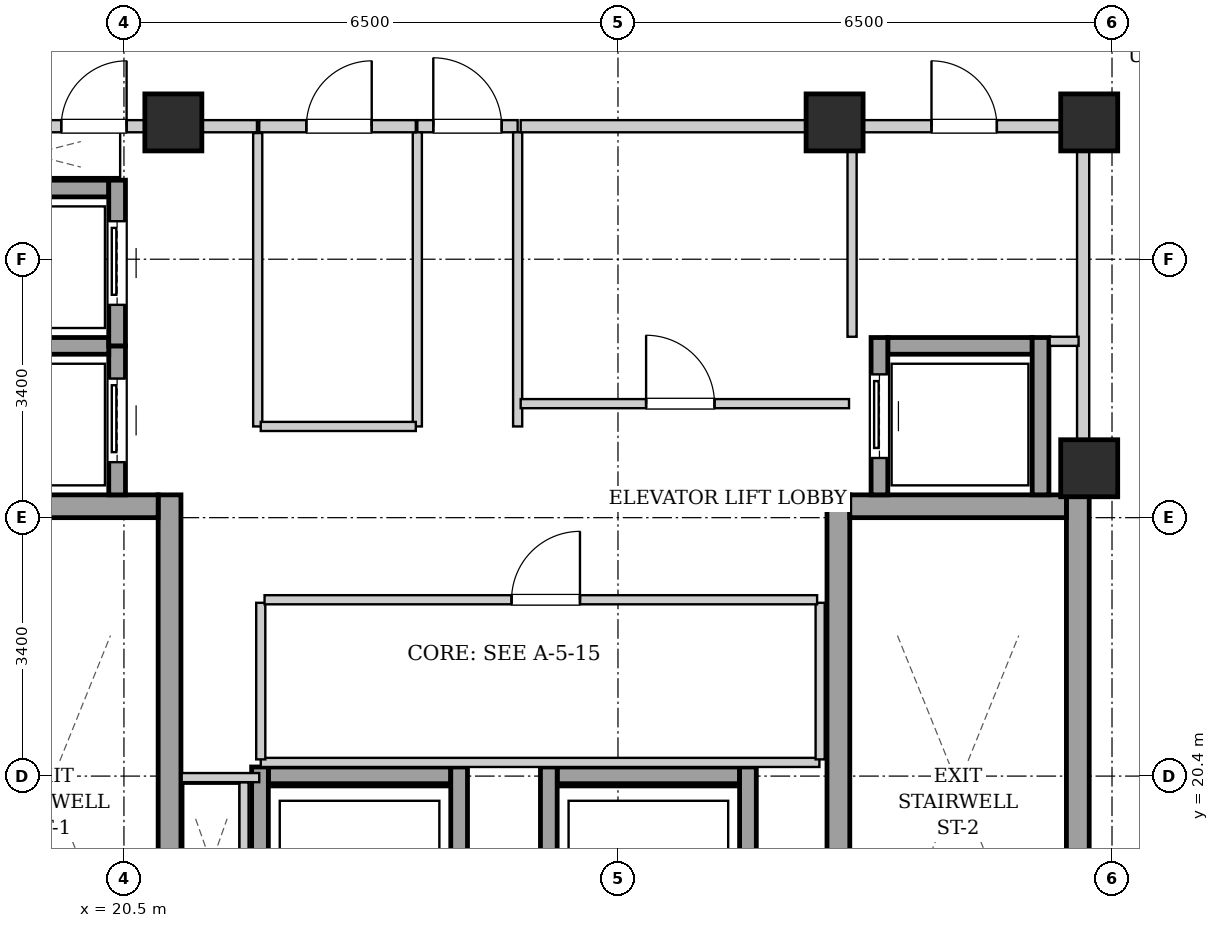
"""IFC4 building model, lengths in metres.
Left out: names, types, materials, properties, quantities, classifications, styles, units other than length and angle.
Written with IfcOpenShell. Run it as: python <this file> out.ifc"""

import sys

from ifc_helpers import new_model, si_unit, direction, frame, frame_2d, origin, origin_2d, place, context, subcontext, project, spatial, rectangle, extrude, element, fill, save


model = new_model("IFC4")
c1 = context("Model", 3, precision=1e-05, world=origin(), true_north=direction((0.0, 1.0)))
c2 = subcontext(c1, "Body", "Model", "MODEL_VIEW")
j1 = project(units=[si_unit("LENGTHUNIT", "METRE"), si_unit("PLANEANGLEUNIT", "RADIAN")], contexts=[c1])
p1 = place(None, origin())
s1 = spatial("IfcSite", under=j1, at=p1, CompositionType="ELEMENT")
p2 = place(p1, origin())
s2 = spatial("IfcBuilding", under=s1, at=p2, CompositionType="ELEMENT")
p3 = place(p2, frame((0.0, 0.0, 247.9)))
s3 = spatial("IfcBuildingStorey", under=s2, at=p3, CompositionType="ELEMENT", Elevation=247.9)
for number, where, z_axis, x_axis in (
    (1, (21.15, 29.0, 0.0), (0.0, 0.0, 1.0), (1.0, 0.0, 0.0)),
    (2, (29.85, 29.0, 0.0), (0.0, 0.0, 1.0), (1.0, 0.0, 0.0)),
    (3, (33.2, 29.0, 0.0), (0.0, 0.0, 1.0), (1.0, 0.0, 0.0)),
    (4, (33.2, 24.45, 0.0), (0.0, 0.0, 1.0), (1.0, 0.0, 0.0)),
):
    element("IfcColumn", number, at=place(p3, frame(where, z_axis=z_axis, x_axis=x_axis)), inside=s3, PredefinedType="COLUMN", context=c2, shape_type="SweptSolid", body=[
        extrude(rectangle(XDim=0.75, YDim=0.75, at=origin_2d()), origin(), (0.0, 0.0, 1.0), 3.4),
    ])
p4 = place(p3, frame((21.1, 15.1, 0.0), z_axis=(0.0, 0.0, 1.0), x_axis=(0.0, 1.0, 0.0)))
e5 = element("IfcWall", 5, at=p4, inside=s3, PredefinedType="SHEAR", context=c2, shape_type="SweptSolid", body=[
    extrude(rectangle(XDim=9.0, YDim=0.3, at=frame_2d((4.5, 0.0))), origin(), (0.0, 0.0, 1.0), 3.14),
])
p5 = place(p3, frame((18.1, 23.95, 0.0), z_axis=(0.0, 0.0, 1.0), x_axis=(1.0, 0.0, 0.0)))
e6 = element("IfcWall", 6, at=p5, inside=s3, PredefinedType="SHEAR", context=c2, shape_type="SweptSolid", body=[
    extrude(rectangle(XDim=2.85, YDim=0.3, at=frame_2d((1.425, 0.0))), origin(), (0.0, 0.0, 1.0), 3.14),
])
for number, where, z_axis, x_axis in (
    (7, (29.9, 15.1, 0.0), (0.0, 0.0, 1.0), (0.0, 1.0, 0.0)),
    (8, (33.05, 15.1, 0.0), (0.0, 0.0, 1.0), (0.0, 1.0, 0.0)),
):
    element("IfcWall", number, at=place(p3, frame(where, z_axis=z_axis, x_axis=x_axis)), inside=s3, PredefinedType="SHEAR", context=c2, shape_type="SweptSolid", body=[
        extrude(rectangle(XDim=9.0, YDim=0.3, at=frame_2d((4.5, 0.0))), origin(), (0.0, 0.0, 1.0), 3.14),
    ])
p6 = place(p3, frame((30.05, 23.95, 0.0), z_axis=(0.0, 0.0, 1.0), x_axis=(1.0, 0.0, 0.0)))
e9 = element("IfcWall", 9, at=p6, inside=s3, PredefinedType="SHEAR", context=c2, shape_type="SweptSolid", body=[
    extrude(rectangle(XDim=2.85, YDim=0.3, at=frame_2d((1.425, 0.0))), origin(), (0.0, 0.0, 1.0), 3.14),
])
p7 = place(p3, frame((20.41, 24.1, 0.0), z_axis=(0.0, 0.0, 1.0), x_axis=(0.0, 1.0, 0.0)))
e10 = element("IfcWall", 10, at=p7, inside=s3, PredefinedType="SHEAR", context=c2, shape_type="SweptSolid", body=[
    extrude(rectangle(XDim=1.96, YDim=0.22, at=frame_2d((0.98, 0.0))), origin(), (0.0, 0.0, 1.0), 3.14),
])
p8 = place(p7, frame((0.43, 0.0, 0.0)))
e11 = element("IfcOpeningElement", 11, at=p8, cuts=e10, PredefinedType="OPENING", context=c2, shape_type="SweptSolid", body=[
    extrude(rectangle(XDim=1.1, YDim=2.15, at=frame_2d((0.55, 1.075))), frame((0.0, 0.12, 0.0), z_axis=(0.0, -1.0, 0.0), x_axis=(1.0, 0.0, 0.0)), (0.0, 0.0, 1.0), 0.24),
])
for number, where, z_axis, x_axis in (
    (12, (18.4, 26.06, 0.0), (0.0, 0.0, 1.0), (1.0, 0.0, 0.0)),
    (13, (18.4, 28.13, 0.0), (0.0, 0.0, 1.0), (1.0, 0.0, 0.0)),
):
    element("IfcWall", number, at=place(p3, frame(where, z_axis=z_axis, x_axis=x_axis)), inside=s3, PredefinedType="SHEAR", context=c2, shape_type="SweptSolid", body=[
        extrude(rectangle(XDim=1.9, YDim=0.22, at=frame_2d((0.95, 0.0))), origin(), (0.0, 0.0, 1.0), 3.14),
    ])
p9 = place(p3, frame((20.41, 26.06, 0.0), z_axis=(0.0, 0.0, 1.0), x_axis=(0.0, 1.0, 0.0)))
e14 = element("IfcWall", 14, at=p9, inside=s3, PredefinedType="SHEAR", context=c2, shape_type="SweptSolid", body=[
    extrude(rectangle(XDim=2.18, YDim=0.22, at=frame_2d((1.09, 0.0))), origin(), (0.0, 0.0, 1.0), 3.14),
])
p10 = place(p9, frame((0.54, 0.0, 0.0)))
e15 = element("IfcOpeningElement", 15, at=p10, cuts=e14, PredefinedType="OPENING", context=c2, shape_type="SweptSolid", body=[
    extrude(rectangle(XDim=1.1, YDim=2.15, at=frame_2d((0.55, 1.075))), frame((0.0, 0.12, 0.0), z_axis=(0.0, -1.0, 0.0), x_axis=(1.0, 0.0, 0.0)), (0.0, 0.0, 1.0), 0.24),
])
p11 = place(p3, frame((30.55, 26.06, 0.0), z_axis=(0.0, 0.0, 1.0), x_axis=(1.0, 0.0, 0.0)))
e16 = element("IfcWall", 16, at=p11, inside=s3, PredefinedType="SHEAR", context=c2, shape_type="SweptSolid", body=[
    extrude(rectangle(XDim=1.9, YDim=0.22, at=frame_2d((0.95, 0.0))), origin(), (0.0, 0.0, 1.0), 3.14),
])
p12 = place(p3, frame((30.44, 24.1, 0.0), z_axis=(0.0, 0.0, 1.0), x_axis=(0.0, 1.0, 0.0)))
e17 = element("IfcWall", 17, at=p12, inside=s3, PredefinedType="SHEAR", context=c2, shape_type="SweptSolid", body=[
    extrude(rectangle(XDim=2.07, YDim=0.22, at=frame_2d((1.035, 0.0))), origin(), (0.0, 0.0, 1.0), 3.14),
])
p13 = place(p12, frame((0.485, 0.0, 0.0)))
e18 = element("IfcOpeningElement", 18, at=p13, cuts=e17, PredefinedType="OPENING", context=c2, shape_type="SweptSolid", body=[
    extrude(rectangle(XDim=1.1, YDim=2.15, at=frame_2d((0.55, 1.075))), frame((0.0, 0.12, 0.0), z_axis=(0.0, -1.0, 0.0), x_axis=(1.0, 0.0, 0.0)), (0.0, 0.0, 1.0), 0.24),
])
p14 = place(p3, frame((32.56, 24.1, 0.0), z_axis=(0.0, 0.0, 1.0), x_axis=(0.0, 1.0, 0.0)))
e19 = element("IfcWall", 19, at=p14, inside=s3, PredefinedType="SHEAR", context=c2, shape_type="SweptSolid", body=[
    extrude(rectangle(XDim=2.07, YDim=0.22, at=frame_2d((1.035, 0.0))), origin(), (0.0, 0.0, 1.0), 3.14),
])
p15 = place(p3, frame((22.4, 20.41, 0.0), z_axis=(0.0, 0.0, 1.0), x_axis=(1.0, 0.0, 0.0)))
e20 = element("IfcWall", 20, at=p15, inside=s3, PredefinedType="SHEAR", context=c2, shape_type="SweptSolid", body=[
    extrude(rectangle(XDim=2.4, YDim=0.22, at=frame_2d((1.2, 0.0))), origin(), (0.0, 0.0, 1.0), 3.14),
])
for number, where, z_axis, x_axis in (
    (21, (22.29, 17.98, 0.0), (0.0, 0.0, 1.0), (0.0, 1.0, 0.0)),
    (22, (24.91, 17.98, 0.0), (0.0, 0.0, 1.0), (0.0, 1.0, 0.0)),
):
    element("IfcWall", number, at=place(p3, frame(where, z_axis=z_axis, x_axis=x_axis)), inside=s3, PredefinedType="SHEAR", context=c2, shape_type="SweptSolid", body=[
        extrude(rectangle(XDim=2.54, YDim=0.22, at=frame_2d((1.27, 0.0))), origin(), (0.0, 0.0, 1.0), 3.14),
    ])
p16 = place(p3, frame((26.2, 20.41, 0.0), z_axis=(0.0, 0.0, 1.0), x_axis=(1.0, 0.0, 0.0)))
e23 = element("IfcWall", 23, at=p16, inside=s3, PredefinedType="SHEAR", context=c2, shape_type="SweptSolid", body=[
    extrude(rectangle(XDim=2.4, YDim=0.22, at=frame_2d((1.2, 0.0))), origin(), (0.0, 0.0, 1.0), 3.14),
])
for number, where, z_axis, x_axis in (
    (24, (26.09, 17.98, 0.0), (0.0, 0.0, 1.0), (0.0, 1.0, 0.0)),
    (25, (28.71, 17.98, 0.0), (0.0, 0.0, 1.0), (0.0, 1.0, 0.0)),
):
    element("IfcWall", number, at=place(p3, frame(where, z_axis=z_axis, x_axis=x_axis)), inside=s3, PredefinedType="SHEAR", context=c2, shape_type="SweptSolid", body=[
        extrude(rectangle(XDim=2.54, YDim=0.22, at=frame_2d((1.27, 0.0))), origin(), (0.0, 0.0, 1.0), 3.14),
    ])
p17 = place(p3, frame((33.12, 24.12, 0.0), z_axis=(0.0, 0.0, 1.0), x_axis=(0.0, 1.0, 0.0)))
e26 = element("IfcWall", 26, at=p17, inside=s3, PredefinedType="PARTITIONING", context=c2, shape_type="SweptSolid", body=[
    extrude(rectangle(XDim=4.76, YDim=0.16, at=frame_2d((2.38, 0.0))), origin(), (0.0, 0.0, 1.0), 2.475),
])
p18 = place(p3, frame((24.36, 28.95, 0.0), z_axis=(0.0, 0.0, 1.0), x_axis=(1.0, 0.0, 0.0)))
e27 = element("IfcWall", 27, at=p18, inside=s3, PredefinedType="PARTITIONING", context=c2, shape_type="SweptSolid", body=[
    extrude(rectangle(XDim=1.32, YDim=0.16, at=frame_2d((0.66, 0.0))), origin(), (0.0, 0.0, 1.0), 2.668),
])
p19 = place(p18, frame((0.21, 0.0, 0.0)))
e28 = element("IfcOpeningElement", 28, at=p19, cuts=e27, PredefinedType="OPENING", context=c2, shape_type="SweptSolid", body=[
    extrude(rectangle(XDim=0.9, YDim=2.05, at=frame_2d((0.45, 1.025))), frame((0.0, 0.09, 0.0), z_axis=(0.0, -1.0, 0.0), x_axis=(1.0, 0.0, 0.0)), (0.0, 0.0, 1.0), 0.18),
])
p20 = place(p3, frame((17.96, 28.95, 0.0), z_axis=(0.0, 0.0, 1.0), x_axis=(1.0, 0.0, 0.0)))
e29 = element("IfcWall", 29, at=p20, inside=s3, PredefinedType="PARTITIONING", context=c2, shape_type="SweptSolid", body=[
    extrude(rectangle(XDim=4.29, YDim=0.16, at=frame_2d((2.145, 0.0))), origin(), (0.0, 0.0, 1.0), 2.668),
])
p21 = place(p20, frame((1.715, 0.0, 0.0)))
e30 = element("IfcOpeningElement", 30, at=p21, cuts=e29, PredefinedType="OPENING", context=c2, shape_type="SweptSolid", body=[
    extrude(rectangle(XDim=0.86, YDim=2.05, at=frame_2d((0.43, 1.025))), frame((0.0, 0.09, 0.0), z_axis=(0.0, -1.0, 0.0), x_axis=(1.0, 0.0, 0.0)), (0.0, 0.0, 1.0), 0.18),
])
p22 = place(p3, frame((22.08, 18.2, 0.0), z_axis=(0.0, 0.0, 1.0), x_axis=(0.0, 1.0, 0.0)))
e31 = element("IfcWall", 31, at=p22, inside=s3, PredefinedType="PARTITIONING", context=c2, shape_type="SweptSolid", body=[
    extrude(rectangle(XDim=2.12, YDim=0.12, at=frame_2d((1.06, 0.0))), origin(), (0.0, 0.0, 1.0), 3.14),
])
p23 = place(p3, frame((22.28, 20.38, 0.0), z_axis=(0.0, 0.0, 1.0), x_axis=(-1.0, 0.0, 0.0)))
e32 = element("IfcWall", 32, at=p23, inside=s3, PredefinedType="PARTITIONING", context=c2, shape_type="SweptSolid", body=[
    extrude(rectangle(XDim=1.02, YDim=0.12, at=frame_2d((0.51, 0.0))), origin(), (0.0, 0.0, 1.0), 3.14),
])
for number, where, z_axis, x_axis in (
    (33, (24.36, 25.0, 0.0), (0.0, 0.0, 1.0), (0.0, 1.0, 0.0)),
    (34, (25.68, 25.0, 0.0), (0.0, 0.0, 1.0), (0.0, 1.0, 0.0)),
):
    element("IfcWall", number, at=place(p3, frame(where, z_axis=z_axis, x_axis=x_axis)), inside=s3, PredefinedType="PARTITIONING", context=c2, shape_type="SweptSolid", body=[
        extrude(rectangle(XDim=3.87, YDim=0.12, at=frame_2d((1.935, 0.0))), origin(), (0.0, 0.0, 1.0), 3.14),
    ])
p24 = place(p3, frame((30.08, 26.18, 0.0), z_axis=(0.0, 0.0, 1.0), x_axis=(0.0, 1.0, 0.0)))
e35 = element("IfcWall", 35, at=p24, inside=s3, PredefinedType="PARTITIONING", context=c2, shape_type="SweptSolid", body=[
    extrude(rectangle(XDim=2.68, YDim=0.12, at=frame_2d((1.34, 0.0))), origin(), (0.0, 0.0, 1.0), 3.14),
])
p25 = place(p3, frame((32.68, 26.12, 0.0), z_axis=(0.0, 0.0, 1.0), x_axis=(1.0, 0.0, 0.0)))
e36 = element("IfcWall", 36, at=p25, inside=s3, PredefinedType="PARTITIONING", context=c2, shape_type="SweptSolid", body=[
    extrude(rectangle(XDim=0.38, YDim=0.12, at=frame_2d((0.19, 0.0))), origin(), (0.0, 0.0, 1.0), 3.14),
])
p26 = place(p3, frame((30.08, 28.95, 0.0), z_axis=(0.0, 0.0, 1.0), x_axis=(1.0, 0.0, 0.0)))
e37 = element("IfcWall", 37, at=p26, inside=s3, PredefinedType="PARTITIONING", context=c2, shape_type="SweptSolid", body=[
    extrude(rectangle(XDim=2.96, YDim=0.16, at=frame_2d((1.48, 0.0))), origin(), (0.0, 0.0, 1.0), 3.14),
])
p27 = place(p26, frame((1.045, 0.0, 0.0)))
e38 = element("IfcOpeningElement", 38, at=p27, cuts=e37, PredefinedType="OPENING", context=c2, shape_type="SweptSolid", body=[
    extrude(rectangle(XDim=0.86, YDim=2.05, at=frame_2d((0.43, 1.025))), frame((0.0, 0.09, 0.0), z_axis=(0.0, -1.0, 0.0), x_axis=(1.0, 0.0, 0.0)), (0.0, 0.0, 1.0), 0.18),
])
p28 = place(p3, frame((22.26, 25.0, 0.0), z_axis=(0.0, 0.0, 1.0), x_axis=(0.0, 1.0, 0.0)))
e39 = element("IfcWall", 39, at=p28, inside=s3, PredefinedType="PARTITIONING", context=c2, shape_type="SweptSolid", body=[
    extrude(rectangle(XDim=3.86, YDim=0.12, at=frame_2d((1.93, 0.0))), origin(), (0.0, 0.0, 1.0), 3.14),
])
p29 = place(p3, frame((22.3, 25.0, 0.0), z_axis=(0.0, 0.0, 1.0), x_axis=(1.0, 0.0, 0.0)))
e40 = element("IfcWall", 40, at=p29, inside=s3, PredefinedType="PARTITIONING", context=c2, shape_type="SweptSolid", body=[
    extrude(rectangle(XDim=2.04, YDim=0.12, at=frame_2d((1.02, 0.0))), origin(), (0.0, 0.0, 1.0), 3.14),
])
p30 = place(p3, frame((22.28, 28.95, 0.0), z_axis=(0.0, 0.0, 1.0), x_axis=(1.0, 0.0, 0.0)))
e41 = element("IfcWall", 41, at=p30, inside=s3, PredefinedType="PARTITIONING", context=c2, shape_type="SweptSolid", body=[
    extrude(rectangle(XDim=2.06, YDim=0.16, at=frame_2d((1.03, 0.0))), origin(), (0.0, 0.0, 1.0), 2.668),
])
p31 = place(p30, frame((0.62, 0.0, 0.0)))
e42 = element("IfcOpeningElement", 42, at=p31, cuts=e41, PredefinedType="OPENING", context=c2, shape_type="SweptSolid", body=[
    extrude(rectangle(XDim=0.86, YDim=2.05, at=frame_2d((0.43, 1.025))), frame((0.0, 0.09, 0.0), z_axis=(0.0, -1.0, 0.0), x_axis=(1.0, 0.0, 0.0)), (0.0, 0.0, 1.0), 0.18),
])
p32 = place(p3, frame((25.72, 28.95, 0.0), z_axis=(0.0, 0.0, 1.0), x_axis=(1.0, 0.0, 0.0)))
e43 = element("IfcWall", 43, at=p32, inside=s3, PredefinedType="PARTITIONING", context=c2, shape_type="SweptSolid", body=[
    extrude(rectangle(XDim=4.32, YDim=0.16, at=frame_2d((2.16, 0.0))), origin(), (0.0, 0.0, 1.0), 2.668),
])
p33 = place(p3, frame((25.72, 25.3, 0.0), z_axis=(0.0, 0.0, 1.0), x_axis=(1.0, 0.0, 0.0)))
e44 = element("IfcWall", 44, at=p33, inside=s3, PredefinedType="PARTITIONING", context=c2, shape_type="SweptSolid", body=[
    extrude(rectangle(XDim=4.32, YDim=0.12, at=frame_2d((2.16, 0.0))), origin(), (0.0, 0.0, 1.0), 3.14),
])
p34 = place(p33, frame((1.65, 0.0, 0.0)))
e45 = element("IfcOpeningElement", 45, at=p34, cuts=e44, PredefinedType="OPENING", context=c2, shape_type="SweptSolid", body=[
    extrude(rectangle(XDim=0.9, YDim=2.05, at=frame_2d((0.45, 1.025))), frame((0.0, 0.07, 0.0), z_axis=(0.0, -1.0, 0.0), x_axis=(1.0, 0.0, 0.0)), (0.0, 0.0, 1.0), 0.14),
])
p35 = place(p3, frame((22.3, 20.58, 0.0), z_axis=(0.0, 0.0, 1.0), x_axis=(1.0, 0.0, 0.0)))
e46 = element("IfcWall", 46, at=p35, inside=s3, PredefinedType="PARTITIONING", context=c2, shape_type="SweptSolid", body=[
    extrude(rectangle(XDim=7.35, YDim=0.12, at=frame_2d((3.675, 0.0))), origin(), (0.0, 0.0, 1.0), 3.14),
])
for number, where, z_axis, x_axis in (
    (47, (22.3, 20.62, 0.0), (0.0, 0.0, 1.0), (0.0, 1.0, 0.0)),
    (48, (29.66, 20.62, 0.0), (0.0, 0.0, 1.0), (0.0, 1.0, 0.0)),
):
    element("IfcWall", number, at=place(p3, frame(where, z_axis=z_axis, x_axis=x_axis)), inside=s3, PredefinedType="PARTITIONING", context=c2, shape_type="SweptSolid", body=[
        extrude(rectangle(XDim=2.06, YDim=0.12, at=frame_2d((1.03, 0.0))), origin(), (0.0, 0.0, 1.0), 3.14),
    ])
p36 = place(p3, frame((22.35, 22.72, 0.0), z_axis=(0.0, 0.0, 1.0), x_axis=(1.0, 0.0, 0.0)))
e49 = element("IfcWall", 49, at=p36, inside=s3, PredefinedType="PARTITIONING", context=c2, shape_type="SweptSolid", body=[
    extrude(rectangle(XDim=7.27, YDim=0.12, at=frame_2d((3.635, 0.0))), origin(), (0.0, 0.0, 1.0), 3.14),
])
p37 = place(p36, frame((3.25, 0.0, 0.0)))
e50 = element("IfcOpeningElement", 50, at=p37, cuts=e49, PredefinedType="OPENING", context=c2, shape_type="SweptSolid", body=[
    extrude(rectangle(XDim=0.9, YDim=2.05, at=frame_2d((0.45, 1.025))), frame((0.0, 0.07, 0.0), z_axis=(0.0, -1.0, 0.0), x_axis=(1.0, 0.0, 0.0)), (0.0, 0.0, 1.0), 0.14),
])
p38 = place(p8, origin())
e51 = element("IfcDoor", 51, at=p38, inside=s3, OperationType="SLIDING_TO_LEFT", PredefinedType="DOOR", context=c2, shape_type="SweptSolid", body=[
    extrude(rectangle(XDim=1.1, YDim=2.15, at=frame_2d((0.55, 1.075))), frame((0.0, 0.025, 0.0), z_axis=(0.0, -1.0, 0.0), x_axis=(1.0, 0.0, 0.0)), (0.0, 0.0, 1.0), 0.05),
])
fill(e11, e51)
p39 = place(p10, origin())
e52 = element("IfcDoor", 52, at=p39, inside=s3, OperationType="SLIDING_TO_LEFT", PredefinedType="DOOR", context=c2, shape_type="SweptSolid", body=[
    extrude(rectangle(XDim=1.1, YDim=2.15, at=frame_2d((0.55, 1.075))), frame((0.0, 0.025, 0.0), z_axis=(0.0, -1.0, 0.0), x_axis=(1.0, 0.0, 0.0)), (0.0, 0.0, 1.0), 0.05),
])
fill(e15, e52)
p40 = place(p13, origin())
e53 = element("IfcDoor", 53, at=p40, inside=s3, OperationType="SLIDING_TO_LEFT", PredefinedType="DOOR", context=c2, shape_type="SweptSolid", body=[
    extrude(rectangle(XDim=1.1, YDim=2.15, at=frame_2d((0.55, 1.075))), frame((0.0, 0.025, 0.0), z_axis=(0.0, -1.0, 0.0), x_axis=(1.0, 0.0, 0.0)), (0.0, 0.0, 1.0), 0.05),
])
fill(e18, e53)
p41 = place(p19, origin())
e54 = element("IfcDoor", 54, at=p41, inside=s3, OperationType="SINGLE_SWING_LEFT", PredefinedType="DOOR", context=c2, shape_type="SweptSolid", body=[
    extrude(rectangle(XDim=0.9, YDim=2.05, at=frame_2d((0.45, 1.025))), frame((0.0, 0.025, 0.0), z_axis=(0.0, -1.0, 0.0), x_axis=(1.0, 0.0, 0.0)), (0.0, 0.0, 1.0), 0.05),
])
fill(e28, e54)
p42 = place(p21, origin())
e55 = element("IfcDoor", 55, at=p42, inside=s3, OperationType="SINGLE_SWING_RIGHT", PredefinedType="DOOR", context=c2, shape_type="SweptSolid", body=[
    extrude(rectangle(XDim=0.86, YDim=2.05, at=frame_2d((0.43, 1.025))), frame((0.0, 0.025, 0.0), z_axis=(0.0, -1.0, 0.0), x_axis=(1.0, 0.0, 0.0)), (0.0, 0.0, 1.0), 0.05),
])
fill(e30, e55)
p43 = place(p27, origin())
e56 = element("IfcDoor", 56, at=p43, inside=s3, OperationType="SINGLE_SWING_LEFT", PredefinedType="DOOR", context=c2, shape_type="SweptSolid", body=[
    extrude(rectangle(XDim=0.86, YDim=2.05, at=frame_2d((0.43, 1.025))), frame((0.0, 0.025, 0.0), z_axis=(0.0, -1.0, 0.0), x_axis=(1.0, 0.0, 0.0)), (0.0, 0.0, 1.0), 0.05),
])
fill(e38, e56)
p44 = place(p31, origin())
e57 = element("IfcDoor", 57, at=p44, inside=s3, OperationType="SINGLE_SWING_RIGHT", PredefinedType="DOOR", context=c2, shape_type="SweptSolid", body=[
    extrude(rectangle(XDim=0.86, YDim=2.05, at=frame_2d((0.43, 1.025))), frame((0.0, 0.025, 0.0), z_axis=(0.0, -1.0, 0.0), x_axis=(1.0, 0.0, 0.0)), (0.0, 0.0, 1.0), 0.05),
])
fill(e42, e57)
p45 = place(p34, origin())
e58 = element("IfcDoor", 58, at=p45, inside=s3, OperationType="SINGLE_SWING_LEFT", PredefinedType="DOOR", context=c2, shape_type="SweptSolid", body=[
    extrude(rectangle(XDim=0.9, YDim=2.05, at=frame_2d((0.45, 1.025))), frame((0.0, 0.025, 0.0), z_axis=(0.0, -1.0, 0.0), x_axis=(1.0, 0.0, 0.0)), (0.0, 0.0, 1.0), 0.05),
])
fill(e45, e58)
p46 = place(p37, origin())
e59 = element("IfcDoor", 59, at=p46, inside=s3, OperationType="SINGLE_SWING_RIGHT", PredefinedType="DOOR", context=c2, shape_type="SweptSolid", body=[
    extrude(rectangle(XDim=0.9, YDim=2.05, at=frame_2d((0.45, 1.025))), frame((0.0, 0.025, 0.0), z_axis=(0.0, -1.0, 0.0), x_axis=(1.0, 0.0, 0.0)), (0.0, 0.0, 1.0), 0.05),
])
fill(e50, e59)
save(model, sys.argv[1])
